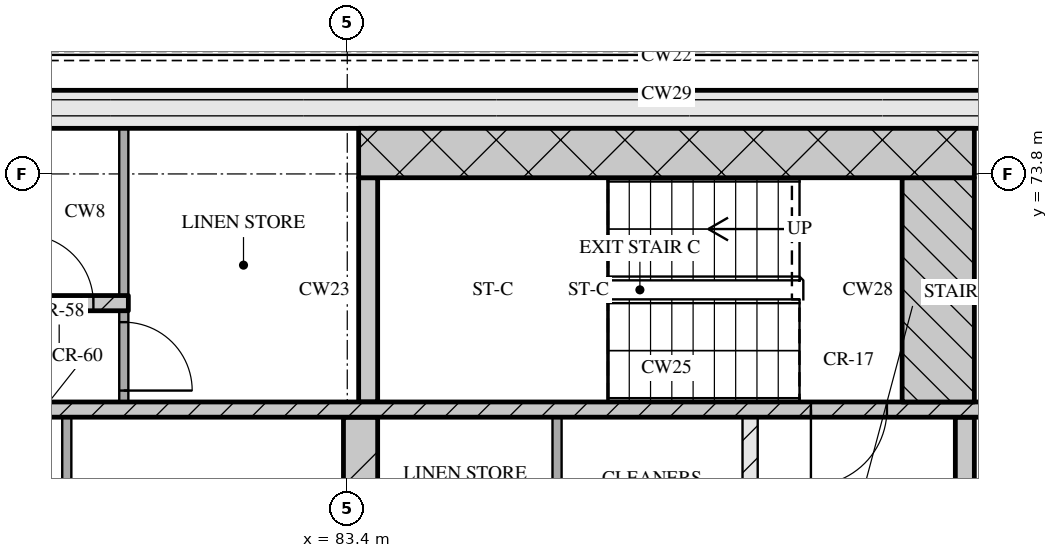
"""IFC4 building model, lengths in metres.
Left out: names, types, materials, properties, quantities, classifications, styles, units other than length and angle.
Written with IfcOpenShell. Run it as: python <this file> out.ifc"""

import sys

from ifc_helpers import new_model, si_unit, direction, frame, frame_2d, origin, place, context, subcontext, project, spatial, rectangle, extrude, element, fill, save


model = new_model("IFC4")
c1 = context("Model", 3, precision=1e-05, world=origin(), true_north=direction((0.0, 1.0)))
c2 = subcontext(c1, "Body", "Model", "MODEL_VIEW")
j1 = project(units=[si_unit("LENGTHUNIT", "METRE"), si_unit("PLANEANGLEUNIT", "RADIAN")], contexts=[c1])
p1 = place(None, origin())
s1 = spatial("IfcSite", under=j1, at=p1, CompositionType="ELEMENT")
p2 = place(p1, origin())
s2 = spatial("IfcBuilding", under=s1, at=p2, CompositionType="ELEMENT")
p3 = place(p2, frame((0.0, 0.0, 281.55)))
s3 = spatial("IfcBuildingStorey", under=s2, at=p3, CompositionType="ELEMENT", Elevation=281.55)
p4 = place(p3, frame((67.3, 74.65, 0.0), z_axis=(0.0, 0.0, 1.0), x_axis=(1.0, 0.0, 0.0)))
e1 = element("IfcWall", 1, at=p4, inside=s3, PredefinedType="SOLIDWALL", context=c2, shape_type="SweptSolid", body=[
    extrude(rectangle(XDim=40.6, YDim=0.5, at=frame_2d((20.3, 0.0))), origin(), (0.0, 0.0, 1.0), 3.32),
])
p5 = place(p3, frame((79.71, 68.0, 0.0), z_axis=(0.0, 0.0, 1.0), x_axis=(0.0, 1.0, 0.0)))
e2 = element("IfcWall", 2, at=p5, inside=s3, PredefinedType="PARTITIONING", context=c2, shape_type="SweptSolid", body=[
    extrude(rectangle(XDim=2.6, YDim=0.12, at=frame_2d((1.3, 0.0))), origin(), (0.0, 0.0, 1.0), 3.32),
])
p6 = place(p3, frame((83.575, 68.0, 0.0), z_axis=(0.0, 0.0, 1.0), x_axis=(0.0, 1.0, 0.0)))
e3 = element("IfcWall", 3, at=p6, inside=s3, PredefinedType="SOLIDWALL", context=c2, shape_type="SweptSolid", body=[
    extrude(rectangle(XDim=2.6, YDim=0.45, at=frame_2d((1.3, 0.0))), origin(), (0.0, 0.0, 1.0), 3.32),
])
p7 = place(p3, frame((86.16, 68.0, 0.0), z_axis=(0.0, 0.0, 1.0), x_axis=(0.0, 1.0, 0.0)))
e4 = element("IfcWall", 4, at=p7, inside=s3, PredefinedType="PARTITIONING", context=c2, shape_type="SweptSolid", body=[
    extrude(rectangle(XDim=2.6, YDim=0.12, at=frame_2d((1.3, 0.0))), origin(), (0.0, 0.0, 1.0), 3.32),
])
p8 = place(p3, frame((88.7, 68.0, 0.0), z_axis=(0.0, 0.0, 1.0), x_axis=(0.0, 1.0, 0.0)))
e5 = element("IfcWall", 5, at=p8, inside=s3, PredefinedType="PARTITIONING", context=c2, shape_type="SweptSolid", body=[
    extrude(rectangle(XDim=2.6, YDim=0.2, at=frame_2d((1.3, 0.0))), origin(), (0.0, 0.0, 1.0), 3.32),
])
p9 = place(p3, frame((91.525, 68.0, 0.0), z_axis=(0.0, 0.0, 1.0), x_axis=(0.0, 1.0, 0.0)))
e6 = element("IfcWall", 6, at=p9, inside=s3, PredefinedType="SOLIDWALL", context=c2, shape_type="SweptSolid", body=[
    extrude(rectangle(XDim=2.6, YDim=0.25, at=frame_2d((1.3, 0.0))), origin(), (0.0, 0.0, 1.0), 3.32),
])
p10 = place(p3, frame((67.8, 70.7, 0.0), z_axis=(0.0, 0.0, 1.0), x_axis=(1.0, 0.0, 0.0)))
e7 = element("IfcWall", 7, at=p10, inside=s3, PredefinedType="SOLIDWALL", context=c2, shape_type="SweptSolid", body=[
    extrude(rectangle(XDim=39.6, YDim=0.2, at=frame_2d((19.8, 0.0))), origin(), (0.0, 0.0, 1.0), 3.32),
])
p11 = place(p10, frame((0.65, 0.0, 0.0)))
e8 = element("IfcOpeningElement", 8, at=p11, cuts=e7, PredefinedType="OPENING", context=c2, shape_type="SweptSolid", body=[
    extrude(rectangle(XDim=1.1, YDim=2.1, at=frame_2d((0.55, 1.05))), frame((0.0, 0.11, 0.0), z_axis=(0.0, -1.0, 0.0), x_axis=(1.0, 0.0, 0.0)), (0.0, 0.0, 1.0), 0.22),
])
p12 = place(p10, frame((3.25, 0.0, 0.0)))
e9 = element("IfcOpeningElement", 9, at=p12, cuts=e7, PredefinedType="OPENING", context=c2, shape_type="SweptSolid", body=[
    extrude(rectangle(XDim=1.1, YDim=2.1, at=frame_2d((0.55, 1.05))), frame((0.0, 0.11, 0.0), z_axis=(0.0, -1.0, 0.0), x_axis=(1.0, 0.0, 0.0)), (0.0, 0.0, 1.0), 0.22),
])
p13 = place(p10, frame((5.9, 0.0, 0.0)))
e10 = element("IfcOpeningElement", 10, at=p13, cuts=e7, PredefinedType="OPENING", context=c2, shape_type="SweptSolid", body=[
    extrude(rectangle(XDim=1.0, YDim=2.1, at=frame_2d((0.5, 1.05))), frame((0.0, 0.11, 0.0), z_axis=(0.0, -1.0, 0.0), x_axis=(1.0, 0.0, 0.0)), (0.0, 0.0, 1.0), 0.22),
])
p14 = place(p10, frame((21.7, 0.0, 0.0)))
e11 = element("IfcOpeningElement", 11, at=p14, cuts=e7, PredefinedType="OPENING", context=c2, shape_type="SweptSolid", body=[
    extrude(rectangle(XDim=1.0, YDim=2.1, at=frame_2d((0.5, 1.05))), frame((0.0, 0.11, 0.0), z_axis=(0.0, -1.0, 0.0), x_axis=(1.0, 0.0, 0.0)), (0.0, 0.0, 1.0), 0.22),
])
p15 = place(p10, frame((32.7, 0.0, 0.0)))
e12 = element("IfcOpeningElement", 12, at=p15, cuts=e7, PredefinedType="OPENING", context=c2, shape_type="SweptSolid", body=[
    extrude(rectangle(XDim=1.0, YDim=2.1, at=frame_2d((0.5, 1.05))), frame((0.0, 0.11, 0.0), z_axis=(0.0, -1.0, 0.0), x_axis=(1.0, 0.0, 0.0)), (0.0, 0.0, 1.0), 0.22),
])
p16 = place(p10, frame((35.25, 0.0, 0.0)))
e13 = element("IfcOpeningElement", 13, at=p16, cuts=e7, PredefinedType="OPENING", context=c2, shape_type="SweptSolid", body=[
    extrude(rectangle(XDim=1.1, YDim=2.1, at=frame_2d((0.55, 1.05))), frame((0.0, 0.11, 0.0), z_axis=(0.0, -1.0, 0.0), x_axis=(1.0, 0.0, 0.0)), (0.0, 0.0, 1.0), 0.22),
])
p17 = place(p10, frame((37.85, 0.0, 0.0)))
e14 = element("IfcOpeningElement", 14, at=p17, cuts=e7, PredefinedType="OPENING", context=c2, shape_type="SweptSolid", body=[
    extrude(rectangle(XDim=1.1, YDim=2.1, at=frame_2d((0.55, 1.05))), frame((0.0, 0.11, 0.0), z_axis=(0.0, -1.0, 0.0), x_axis=(1.0, 0.0, 0.0)), (0.0, 0.0, 1.0), 0.22),
])
p18 = place(p3, frame((80.46, 70.8, 0.0), z_axis=(0.0, 0.0, 1.0), x_axis=(0.0, 1.0, 0.0)))
e15 = element("IfcWall", 15, at=p18, inside=s3, PredefinedType="PARTITIONING", context=c2, shape_type="SweptSolid", body=[
    extrude(rectangle(XDim=1.2, YDim=0.12, at=frame_2d((0.6, 0.0))), origin(), (0.0, 0.0, 1.0), 3.32),
])
p19 = place(p18, frame((0.15, 0.0, 0.0)))
e16 = element("IfcOpeningElement", 16, at=p19, cuts=e15, PredefinedType="OPENING", context=c2, shape_type="SweptSolid", body=[
    extrude(rectangle(XDim=0.9, YDim=2.1, at=frame_2d((0.45, 1.05))), frame((0.0, 0.07, 0.0), z_axis=(0.0, -1.0, 0.0), x_axis=(1.0, 0.0, 0.0)), (0.0, 0.0, 1.0), 0.14),
])
p20 = place(p3, frame((83.675, 70.8, 0.0), z_axis=(0.0, 0.0, 1.0), x_axis=(0.0, 1.0, 0.0)))
e17 = element("IfcWall", 17, at=p20, inside=s3, PredefinedType="SOLIDWALL", context=c2, shape_type="SweptSolid", body=[
    extrude(rectangle(XDim=2.95, YDim=0.25, at=frame_2d((1.475, 0.0))), origin(), (0.0, 0.0, 1.0), 3.32),
])
p21 = place(p3, frame((91.175, 70.8, 0.0), z_axis=(0.0, 0.0, 1.0), x_axis=(0.0, 1.0, 0.0)))
e18 = element("IfcWall", 18, at=p21, inside=s3, PredefinedType="SOLIDWALL", context=c2, shape_type="SweptSolid", body=[
    extrude(rectangle(XDim=2.95, YDim=0.95, at=frame_2d((1.475, 0.0))), origin(), (0.0, 0.0, 1.0), 3.32),
])
p22 = place(p3, frame((72.8, 72.1, 0.0), z_axis=(0.0, 0.0, 1.0), x_axis=(1.0, 0.0, 0.0)))
e19 = element("IfcWall", 19, at=p22, inside=s3, PredefinedType="SOLIDWALL", context=c2, shape_type="SweptSolid", body=[
    extrude(rectangle(XDim=7.72, YDim=0.2, at=frame_2d((3.86, 0.0))), origin(), (0.0, 0.0, 1.0), 3.32),
])
p23 = place(p22, frame((1.25, 0.0, 0.0)))
e20 = element("IfcOpeningElement", 20, at=p23, cuts=e19, PredefinedType="OPENING", context=c2, shape_type="SweptSolid", body=[
    extrude(rectangle(XDim=0.9, YDim=2.1, at=frame_2d((0.45, 1.05))), frame((0.0, 0.11, 0.0), z_axis=(0.0, -1.0, 0.0), x_axis=(1.0, 0.0, 0.0)), (0.0, 0.0, 1.0), 0.22),
])
p24 = place(p22, frame((4.2, 0.0, 0.0)))
e21 = element("IfcOpeningElement", 21, at=p24, cuts=e19, PredefinedType="OPENING", context=c2, shape_type="SweptSolid", body=[
    extrude(rectangle(XDim=0.9, YDim=2.1, at=frame_2d((0.45, 1.05))), frame((0.0, 0.11, 0.0), z_axis=(0.0, -1.0, 0.0), x_axis=(1.0, 0.0, 0.0)), (0.0, 0.0, 1.0), 0.22),
])
p25 = place(p22, frame((6.36, 0.0, 0.0)))
e22 = element("IfcOpeningElement", 22, at=p25, cuts=e19, PredefinedType="OPENING", context=c2, shape_type="SweptSolid", body=[
    extrude(rectangle(XDim=0.9, YDim=2.1, at=frame_2d((0.45, 1.05))), frame((0.0, 0.11, 0.0), z_axis=(0.0, -1.0, 0.0), x_axis=(1.0, 0.0, 0.0)), (0.0, 0.0, 1.0), 0.22),
])
p26 = place(p3, frame((80.46, 72.2, 0.0), z_axis=(0.0, 0.0, 1.0), x_axis=(0.0, 1.0, 0.0)))
e23 = element("IfcWall", 23, at=p26, inside=s3, PredefinedType="PARTITIONING", context=c2, shape_type="SweptSolid", body=[
    extrude(rectangle(XDim=2.2, YDim=0.12, at=frame_2d((1.1, 0.0))), origin(), (0.0, 0.0, 1.0), 3.32),
])
p27 = place(p3, frame((83.55, 74.075, 0.0), z_axis=(0.0, 0.0, 1.0), x_axis=(1.0, 0.0, 0.0)))
e24 = element("IfcWall", 24, at=p27, inside=s3, PredefinedType="SOLIDWALL", context=c2, shape_type="SweptSolid", body=[
    extrude(rectangle(XDim=8.1, YDim=0.65, at=frame_2d((4.05, 0.0))), origin(), (0.0, 0.0, 1.0), 3.32),
])
p28 = place(p14, origin())
e25 = element("IfcDoor", 25, at=p28, inside=s3, OperationType="SINGLE_SWING_RIGHT", PredefinedType="DOOR", context=c2, shape_type="SweptSolid", body=[
    extrude(rectangle(XDim=1.0, YDim=2.1, at=frame_2d((0.5, 1.05))), frame((0.0, 0.025, 0.0), z_axis=(0.0, -1.0, 0.0), x_axis=(1.0, 0.0, 0.0)), (0.0, 0.0, 1.0), 0.05),
])
fill(e11, e25)
p29 = place(p19, origin())
e26 = element("IfcDoor", 26, at=p29, inside=s3, OperationType="SINGLE_SWING_RIGHT", PredefinedType="DOOR", context=c2, shape_type="SweptSolid", body=[
    extrude(rectangle(XDim=0.9, YDim=2.1, at=frame_2d((0.45, 1.05))), frame((0.0, 0.025, 0.0), z_axis=(0.0, -1.0, 0.0), x_axis=(1.0, 0.0, 0.0)), (0.0, 0.0, 1.0), 0.05),
])
fill(e16, e26)
p30 = place(p25, origin())
e27 = element("IfcDoor", 27, at=p30, inside=s3, OperationType="SINGLE_SWING_LEFT", PredefinedType="DOOR", context=c2, shape_type="SweptSolid", body=[
    extrude(rectangle(XDim=0.9, YDim=2.1, at=frame_2d((0.45, 1.05))), frame((0.0, 0.025, 0.0), z_axis=(0.0, -1.0, 0.0), x_axis=(1.0, 0.0, 0.0)), (0.0, 0.0, 1.0), 0.05),
])
fill(e22, e27)
save(model, sys.argv[1])
